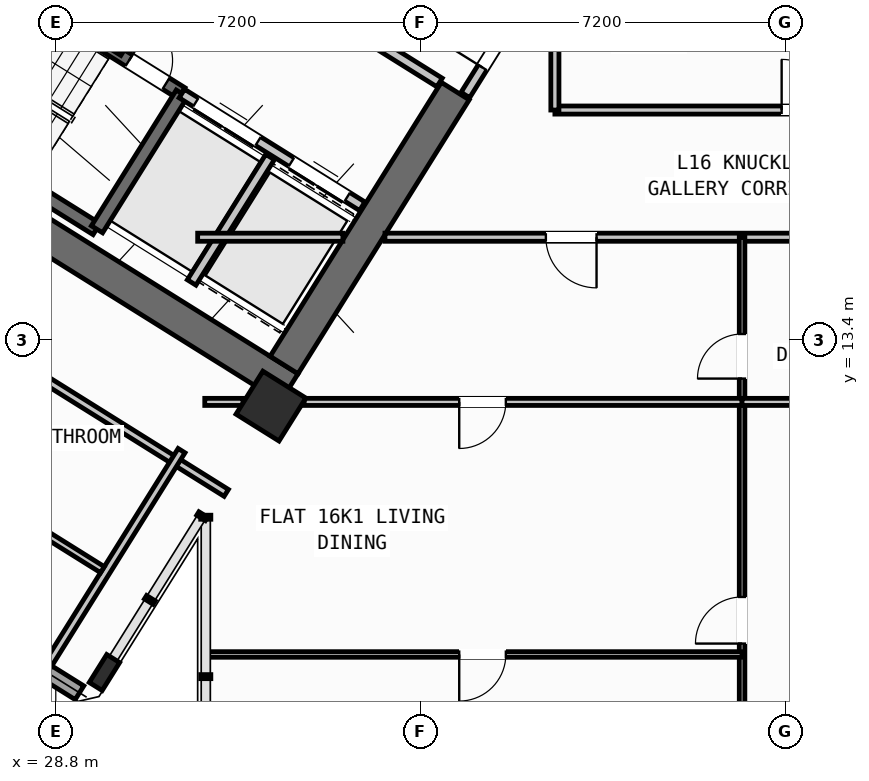
"""IFC4 building model, lengths in metres.
Left out: names, types, materials, properties, quantities, classifications, styles, units other than length and angle.
Written with IfcOpenShell. Run it as: python <this file> out.ifc"""

import sys

from ifc_helpers import new_model, si_unit, direction, frame, frame_2d, origin, origin_2d, place, context, subcontext, project, spatial, rectangle, hollow_rectangle, i_section, extrude, source, transform, mapped, element, fill, save


model = new_model("IFC4")
c1 = context("Model", 3, precision=1e-05, world=origin(), true_north=direction((0.0, 1.0)))
c2 = subcontext(c1, "Body", "Model", "MODEL_VIEW")
j1 = project(units=[si_unit("LENGTHUNIT", "METRE"), si_unit("PLANEANGLEUNIT", "RADIAN")], contexts=[c1])
p1 = place(None, origin())
s1 = spatial("IfcSite", under=j1, at=p1, CompositionType="ELEMENT")
p2 = place(p1, origin())
s2 = spatial("IfcBuilding", under=s1, at=p2, CompositionType="ELEMENT")
p3 = place(p2, frame((0.0, 0.0, 63.6)))
s3 = spatial("IfcBuildingStorey", under=s2, at=p3, CompositionType="ELEMENT", Elevation=63.6)
p4 = place(p3, frame((33.409, 12.45, 0.0), z_axis=(0.0, 0.0, 1.0), x_axis=(-0.848051132073, 0.529914405721, 0.0)))
e1 = element("IfcWall", 1, at=p4, inside=s3, PredefinedType="SHEAR", context=c2, shape_type="SweptSolid", body=[
    extrude(rectangle(XDim=13.24, YDim=0.65, at=frame_2d((6.62, 0.0))), origin(), (0.0, 0.0, 1.0), 3.35),
])
p5 = place(p3, frame((36.683, 18.304, 0.0), z_axis=(0.0, 0.0, 1.0), x_axis=(-0.529899109053, -0.848060690178, 0.0)))
e2 = element("IfcWall", 2, at=p5, inside=s3, PredefinedType="SHEAR", context=c2, shape_type="SweptSolid", body=[
    extrude(rectangle(XDim=6.375, YDim=0.65, at=frame_2d((3.188, 0.0))), origin(), (0.0, 0.0, 1.0), 3.35),
])
m1 = source(origin(), c2, "Body", "SweptSolid", [
    extrude(hollow_rectangle(XDim=1.0, YDim=1.0, WallThickness=0.04, at=origin_2d()), origin(), (0.0, 0.0, 1.0), 3.6),
])
p6 = place(p3, frame((33.046, 12.087, 0.0), z_axis=(0.0, 0.0, 1.0), x_axis=(-0.848048096156, 0.529919264233, 0.0)))
e3 = element("IfcColumn", 3, at=p6, inside=s3, PredefinedType="COLUMN", context=c2, shape_type="MappedRepresentation", body=[
    mapped(m1, transform((0.0, 0.0, 0.0), scale=1.0)),
])
m2 = source(origin(), c2, "Body", "SweptSolid", [
    extrude(i_section(OverallWidth=0.3, OverallDepth=0.65, WebThickness=0.016, FlangeThickness=0.031, at=origin_2d()), origin(), (0.0, 0.0, 1.0), 3.6),
])
p7 = place(p3, frame((29.761, 6.829, 0.0), z_axis=(0.0, 0.0, 1.0), x_axis=(-0.848048096156, 0.529919264233, 0.0)))
e4 = element("IfcColumn", 4, at=p7, inside=s3, PredefinedType="COLUMN", context=c2, shape_type="MappedRepresentation", body=[
    mapped(m2, transform((0.0, 0.0, 0.0), scale=1.0)),
])
p8 = place(p3, frame((29.268, 6.429, 0.0), z_axis=(0.0, 0.0, 1.0), x_axis=(-0.848049971435, 0.529916263149, 0.0)))
e5 = element("IfcWall", 5, at=p8, inside=s3, PredefinedType="STANDARD", context=c2, shape_type="SweptSolid", body=[
    extrude(rectangle(XDim=31.588, YDim=0.32, at=frame_2d((15.794, 0.0))), origin(), (0.0, 0.0, 1.0), 3.35),
])
p9 = place(p8, frame((16.362, 0.0, 0.0)))
e6 = element("IfcOpeningElement", 6, at=p9, cuts=e5, PredefinedType="OPENING", context=c2, shape_type="SweptSolid", body=[
    extrude(rectangle(XDim=1.2, YDim=2.15, at=frame_2d((0.6, 1.075))), frame((0.0, 0.17, 0.0), z_axis=(0.0, -1.0, 0.0), x_axis=(1.0, 0.0, 0.0)), (0.0, 0.0, 1.0), 0.34),
])
p10 = place(p8, frame((2.989, 0.0, 0.8)))
e7 = element("IfcOpeningElement", 7, at=p10, cuts=e5, PredefinedType="OPENING", context=c2, shape_type="SweptSolid", body=[
    extrude(rectangle(XDim=2.1, YDim=1.55, at=frame_2d((1.05, 0.775))), frame((0.0, 0.17, 0.0), z_axis=(0.0, -1.0, 0.0), x_axis=(1.0, 0.0, 0.0)), (0.0, 0.0, 1.0), 0.34),
])
p11 = place(p8, frame((8.359, 0.0, 0.8)))
e8 = element("IfcOpeningElement", 8, at=p11, cuts=e5, PredefinedType="OPENING", context=c2, shape_type="SweptSolid", body=[
    extrude(rectangle(XDim=2.1, YDim=1.55, at=frame_2d((1.05, 0.775))), frame((0.0, 0.17, 0.0), z_axis=(0.0, -1.0, 0.0), x_axis=(1.0, 0.0, 0.0)), (0.0, 0.0, 1.0), 0.34),
])
p12 = place(p8, frame((13.284, 0.0, 0.95)))
e9 = element("IfcOpeningElement", 9, at=p12, cuts=e5, PredefinedType="OPENING", context=c2, shape_type="SweptSolid", body=[
    extrude(rectangle(XDim=1.2, YDim=1.4, at=frame_2d((0.6, 0.7))), frame((0.0, 0.17, 0.0), z_axis=(0.0, -1.0, 0.0), x_axis=(1.0, 0.0, 0.0)), (0.0, 0.0, 1.0), 0.34),
])
p13 = place(p8, frame((29.188, 0.0, 0.95)))
e10 = element("IfcOpeningElement", 10, at=p13, cuts=e5, PredefinedType="OPENING", context=c2, shape_type="SweptSolid", body=[
    extrude(rectangle(XDim=1.2, YDim=1.4, at=frame_2d((0.6, 0.7))), frame((0.0, 0.17, 0.0), z_axis=(0.0, -1.0, 0.0), x_axis=(1.0, 0.0, 0.0)), (0.0, 0.0, 1.0), 0.34),
])
p14 = place(p8, frame((19.11, 0.0, 1.0)))
e11 = element("IfcOpeningElement", 11, at=p14, cuts=e5, PredefinedType="OPENING", context=c2, shape_type="SweptSolid", body=[
    extrude(rectangle(XDim=0.9, YDim=1.25, at=frame_2d((0.45, 0.625))), frame((0.0, 0.17, 0.0), z_axis=(0.0, -1.0, 0.0), x_axis=(1.0, 0.0, 0.0)), (0.0, 0.0, 1.0), 0.34),
])
p15 = place(p8, frame((21.226, 0.0, 1.0)))
e12 = element("IfcOpeningElement", 12, at=p15, cuts=e5, PredefinedType="OPENING", context=c2, shape_type="SweptSolid", body=[
    extrude(rectangle(XDim=0.9, YDim=1.25, at=frame_2d((0.45, 0.625))), frame((0.0, 0.17, 0.0), z_axis=(0.0, -1.0, 0.0), x_axis=(1.0, 0.0, 0.0)), (0.0, 0.0, 1.0), 0.34),
])
p16 = place(p8, frame((23.014, 0.0, 1.0)))
e13 = element("IfcOpeningElement", 13, at=p16, cuts=e5, PredefinedType="OPENING", context=c2, shape_type="SweptSolid", body=[
    extrude(rectangle(XDim=0.9, YDim=1.25, at=frame_2d((0.45, 0.625))), frame((0.0, 0.17, 0.0), z_axis=(0.0, -1.0, 0.0), x_axis=(1.0, 0.0, 0.0)), (0.0, 0.0, 1.0), 0.34),
])
p17 = place(p8, frame((24.802, 0.0, 1.0)))
e14 = element("IfcOpeningElement", 14, at=p17, cuts=e5, PredefinedType="OPENING", context=c2, shape_type="SweptSolid", body=[
    extrude(rectangle(XDim=0.9, YDim=1.25, at=frame_2d((0.45, 0.625))), frame((0.0, 0.17, 0.0), z_axis=(0.0, -1.0, 0.0), x_axis=(1.0, 0.0, 0.0)), (0.0, 0.0, 1.0), 0.34),
])
p18 = place(p8, frame((26.59, 0.0, 1.0)))
e15 = element("IfcOpeningElement", 15, at=p18, cuts=e5, PredefinedType="OPENING", context=c2, shape_type="SweptSolid", body=[
    extrude(rectangle(XDim=0.9, YDim=1.25, at=frame_2d((0.45, 0.625))), frame((0.0, 0.17, 0.0), z_axis=(0.0, -1.0, 0.0), x_axis=(1.0, 0.0, 0.0)), (0.0, 0.0, 1.0), 0.34),
])
p19 = place(p3, frame((29.605, 15.581, 0.0), z_axis=(0.0, 0.0, 1.0), x_axis=(-0.848036911448, 0.529937163087, 0.0)))
e16 = element("IfcWall", 16, at=p19, inside=s3, PredefinedType="SHEAR", context=c2, shape_type="SweptSolid", body=[
    extrude(rectangle(XDim=7.46, YDim=0.26, at=frame_2d((3.73, 0.0))), origin(), (0.0, 0.0, 1.0), 3.35),
])
p20 = place(p3, frame((31.28, 18.261, 0.0), z_axis=(0.0, 0.0, 1.0), x_axis=(-0.848051618787, 0.529913626805, 0.0)))
e17 = element("IfcWall", 17, at=p20, inside=s3, PredefinedType="SHEAR", context=c2, shape_type="SweptSolid", body=[
    extrude(rectangle(XDim=7.46, YDim=0.26, at=frame_2d((3.73, 0.0))), origin(), (0.0, 0.0, 1.0), 3.35),
])
p21 = place(p20, frame((0.36, 0.0, 0.0)))
e18 = element("IfcOpeningElement", 18, at=p21, cuts=e17, PredefinedType="OPENING", context=c2, shape_type="SweptSolid", body=[
    extrude(rectangle(XDim=0.86, YDim=2.05, at=frame_2d((0.43, 1.025))), frame((0.0, 0.14, 0.0), z_axis=(0.0, -1.0, 0.0), x_axis=(1.0, 0.0, 0.0)), (0.0, 0.0, 1.0), 0.28),
])
p22 = place(p3, frame((31.288, 18.256, 0.0), z_axis=(0.0, 0.0, 1.0), x_axis=(-0.529943379326, -0.848033026897, 0.0)))
e19 = element("IfcWall", 19, at=p22, inside=s3, PredefinedType="SHEAR", context=c2, shape_type="SweptSolid", body=[
    extrude(rectangle(XDim=3.16, YDim=0.26, at=frame_2d((1.58, 0.0))), origin(), (0.0, 0.0, 1.0), 3.35),
])
p23 = place(p3, frame((34.848, 16.031, 0.0), z_axis=(0.0, 0.0, 1.0), x_axis=(-0.848044042236, 0.529925751807, 0.0)))
e20 = element("IfcWall", 20, at=p23, inside=s3, PredefinedType="STANDARD", context=c2, shape_type="SweptSolid", body=[
    extrude(rectangle(XDim=4.198, YDim=0.2, at=frame_2d((2.099, 0.0))), origin(), (0.0, 0.0, 1.0), 3.34),
])
p24 = place(p23, frame((0.348, 0.0, 0.0)))
e21 = element("IfcOpeningElement", 21, at=p24, cuts=e20, PredefinedType="OPENING", context=c2, shape_type="SweptSolid", body=[
    extrude(rectangle(XDim=1.3, YDim=2.2, at=frame_2d((0.65, 1.1))), frame((0.0, 0.11, 0.0), z_axis=(0.0, -1.0, 0.0), x_axis=(1.0, 0.0, 0.0)), (0.0, 0.0, 1.0), 0.22),
])
p25 = place(p23, frame((2.423, 0.0, 0.0)))
e22 = element("IfcOpeningElement", 22, at=p25, cuts=e20, PredefinedType="OPENING", context=c2, shape_type="SweptSolid", body=[
    extrude(rectangle(XDim=1.45, YDim=2.25, at=frame_2d((0.725, 1.125))), frame((0.0, 0.11, 0.0), z_axis=(0.0, -1.0, 0.0), x_axis=(1.0, 0.0, 0.0)), (0.0, 0.0, 1.0), 0.22),
])
p26 = place(p3, frame((36.374, 18.474, 0.0), z_axis=(0.0, 0.0, 1.0), x_axis=(-0.848051071577, 0.529914502535, 0.0)))
e23 = element("IfcWall", 23, at=p26, inside=s3, PredefinedType="STANDARD", context=c2, shape_type="SweptSolid", body=[
    extrude(rectangle(XDim=5.718, YDim=0.2, at=frame_2d((2.859, 0.0))), origin(), (0.0, 0.0, 1.0), 3.34),
])
p27 = place(p26, frame((2.498, 0.0, 0.0)))
e24 = element("IfcOpeningElement", 24, at=p27, cuts=e23, PredefinedType="OPENING", context=c2, shape_type="SweptSolid", body=[
    extrude(rectangle(XDim=1.15, YDim=2.1, at=frame_2d((0.575, 1.05))), frame((0.0, 0.11, 0.0), z_axis=(0.0, -1.0, 0.0), x_axis=(1.0, 0.0, 0.0)), (0.0, 0.0, 1.0), 0.22),
])
p28 = place(p3, frame((33.029, 17.003, 0.0), z_axis=(0.0, 0.0, 1.0), x_axis=(-0.529916267533, -0.848049968695, 0.0)))
e25 = element("IfcWall", 25, at=p28, inside=s3, PredefinedType="STANDARD", context=c2, shape_type="SweptSolid", body=[
    extrude(rectangle(XDim=2.92, YDim=0.2, at=frame_2d((1.46, 0.0))), origin(), (0.0, 0.0, 1.0), 3.34),
])
p29 = place(p3, frame((31.525, 21.504, 0.0), z_axis=(0.0, 0.0, 1.0), x_axis=(-0.529907497854, -0.848055448493, 0.0)))
e26 = element("IfcWall", 26, at=p29, inside=s3, PredefinedType="STANDARD", context=c2, shape_type="SweptSolid", body=[
    extrude(rectangle(XDim=2.88, YDim=0.2, at=frame_2d((1.44, 0.0))), origin(), (0.0, 0.0, 1.0), 3.34),
])
p30 = place(p3, frame((32.164, 10.374, 0.0), z_axis=(0.0, 0.0, 1.0), x_axis=(-0.848044107957, 0.529925646633, 0.0)))
e27 = element("IfcWall", 27, at=p30, inside=s3, PredefinedType="PARTITIONING", context=c2, shape_type="SweptSolid", body=[
    extrude(rectangle(XDim=15.57, YDim=0.16, at=frame_2d((7.785, 0.0))), origin(), (0.0, 0.0, 1.0), 3.34),
])
p31 = place(p30, frame((10.83, 0.0, 0.0)))
e28 = element("IfcOpeningElement", 28, at=p31, cuts=e27, PredefinedType="OPENING", context=c2, shape_type="SweptSolid", body=[
    extrude(rectangle(XDim=1.0, YDim=2.1, at=frame_2d((0.5, 1.05))), frame((0.0, 0.09, 0.0), z_axis=(0.0, -1.0, 0.0), x_axis=(1.0, 0.0, 0.0)), (0.0, 0.0, 1.0), 0.18),
])
p32 = place(p3, frame((31.282, 11.208, 0.0), z_axis=(0.0, 0.0, 1.0), x_axis=(-0.529938869374, -0.84803584519, 0.0)))
e29 = element("IfcWall", 29, at=p32, inside=s3, PredefinedType="PARTITIONING", context=c2, shape_type="SweptSolid", body=[
    extrude(rectangle(XDim=5.48, YDim=0.16, at=frame_2d((2.74, 0.0))), origin(), (0.0, 0.0, 1.0), 3.34),
])
p33 = place(p3, frame((29.72, 8.859, 0.0), z_axis=(0.0, 0.0, 1.0), x_axis=(-0.848049134363, 0.529917602752, 0.0)))
e30 = element("IfcWall", 30, at=p33, inside=s3, PredefinedType="PLUMBINGWALL", context=c2, shape_type="SweptSolid", body=[
    extrude(rectangle(XDim=14.3, YDim=0.14, at=frame_2d((7.15, 0.0))), origin(), (0.0, 0.0, 1.0), 3.34),
])
p34 = place(p33, frame((9.57, 0.0, 0.0)))
e31 = element("IfcOpeningElement", 31, at=p34, cuts=e30, PredefinedType="OPENING", context=c2, shape_type="SweptSolid", body=[
    extrude(rectangle(XDim=0.92, YDim=2.08, at=frame_2d((0.46, 1.04))), frame((0.0, 0.08, 0.0), z_axis=(0.0, -1.0, 0.0), x_axis=(1.0, 0.0, 0.0)), (0.0, 0.0, 1.0), 0.16),
])
p35 = place(p3, frame((38.451, 20.737, 0.0), z_axis=(0.0, 0.0, 1.0), x_axis=(-0.529924799939, -0.848044637038, 0.0)))
e32 = element("IfcWall", 32, at=p35, inside=s3, PredefinedType="STANDARD", context=c2, shape_type="SweptSolid", body=[
    extrude(rectangle(XDim=2.96, YDim=0.2, at=frame_2d((1.48, 0.0))), origin(), (0.0, 0.0, 1.0), 3.34),
])
p36 = place(p35, frame((1.46, 0.0, 0.0)))
e33 = element("IfcOpeningElement", 33, at=p36, cuts=e32, PredefinedType="OPENING", context=c2, shape_type="SweptSolid", body=[
    extrude(rectangle(XDim=0.86, YDim=2.05, at=frame_2d((0.43, 1.025))), frame((0.0, 0.11, 0.0), z_axis=(0.0, -1.0, 0.0), x_axis=(1.0, 0.0, 0.0)), (0.0, 0.0, 1.0), 0.22),
])
p37 = place(p3, frame((31.6, 15.42, 0.0), z_axis=(0.0, 0.0, 1.0), x_axis=(1.0, 0.0, 0.0)))
e34 = element("IfcWall", 34, at=p37, inside=s3, PredefinedType="PARTITIONING", context=c2, shape_type="SweptSolid", body=[
    extrude(rectangle(XDim=2.866, YDim=0.16, at=frame_2d((1.433, 0.0))), origin(), (0.0, 0.0, 1.0), 3.34),
])
p38 = place(p3, frame((35.296, 15.42, 0.0), z_axis=(0.0, 0.0, 1.0), x_axis=(1.0, 0.0, 0.0)))
e35 = element("IfcWall", 35, at=p38, inside=s3, PredefinedType="PARTITIONING", context=c2, shape_type="SweptSolid", body=[
    extrude(rectangle(XDim=15.311, YDim=0.16, at=frame_2d((7.655, 0.0))), origin(), (0.0, 0.0, 1.0), 3.34),
])
p39 = place(p38, frame((3.176, 0.0, 0.0)))
e36 = element("IfcOpeningElement", 36, at=p39, cuts=e35, PredefinedType="OPENING", context=c2, shape_type="SweptSolid", body=[
    extrude(rectangle(XDim=1.0, YDim=2.1, at=frame_2d((0.5, 1.05))), frame((0.0, 0.09, 0.0), z_axis=(0.0, -1.0, 0.0), x_axis=(1.0, 0.0, 0.0)), (0.0, 0.0, 1.0), 0.18),
])
p40 = place(p3, frame((38.65, 17.93, 0.0), z_axis=(0.0, 0.0, 1.0), x_axis=(1.0, 0.0, 0.0)))
e37 = element("IfcWall", 37, at=p40, inside=s3, PredefinedType="PARTITIONING", context=c2, shape_type="SweptSolid", body=[
    extrude(rectangle(XDim=9.95, YDim=0.16, at=frame_2d((4.975, 0.0))), origin(), (0.0, 0.0, 1.0), 3.34),
])
p41 = place(p40, frame((4.475, 0.0, 0.0)))
e38 = element("IfcOpeningElement", 38, at=p41, cuts=e37, PredefinedType="OPENING", context=c2, shape_type="SweptSolid", body=[
    extrude(rectangle(XDim=1.0, YDim=2.1, at=frame_2d((0.5, 1.05))), frame((0.0, 0.09, 0.0), z_axis=(0.0, -1.0, 0.0), x_axis=(1.0, 0.0, 0.0)), (0.0, 0.0, 1.0), 0.18),
])
p42 = place(p3, frame((38.65, 17.93, 0.0), z_axis=(0.0, 0.0, 1.0), x_axis=(0.0, 1.0, 0.0)))
e39 = element("IfcWall", 39, at=p42, inside=s3, PredefinedType="PARTITIONING", context=c2, shape_type="SweptSolid", body=[
    extrude(rectangle(XDim=2.857, YDim=0.16, at=frame_2d((1.428, 0.0))), origin(), (0.0, 0.0, 1.0), 3.34),
])
p43 = place(p3, frame((42.344, 1.96, 0.0), z_axis=(0.0, 0.0, 1.0), x_axis=(0.0, 1.0, 0.0)))
e40 = element("IfcWall", 40, at=p43, inside=s3, PredefinedType="PARTITIONING", context=c2, shape_type="SweptSolid", body=[
    extrude(rectangle(XDim=13.46, YDim=0.11, at=frame_2d((6.73, 0.0))), origin(), (0.0, 0.0, 1.0), 3.34),
])
p44 = place(p43, frame((5.44, 0.0, 0.0)))
e41 = element("IfcOpeningElement", 41, at=p44, cuts=e40, PredefinedType="OPENING", context=c2, shape_type="SweptSolid", body=[
    extrude(rectangle(XDim=0.92, YDim=2.08, at=frame_2d((0.46, 1.04))), frame((0.0, 0.065, 0.0), z_axis=(0.0, -1.0, 0.0), x_axis=(1.0, 0.0, 0.0)), (0.0, 0.0, 1.0), 0.13),
])
p45 = place(p43, frame((10.67, 0.0, 0.0)))
e42 = element("IfcOpeningElement", 42, at=p45, cuts=e40, PredefinedType="OPENING", context=c2, shape_type="SweptSolid", body=[
    extrude(rectangle(XDim=0.88, YDim=2.08, at=frame_2d((0.44, 1.04))), frame((0.0, 0.065, 0.0), z_axis=(0.0, -1.0, 0.0), x_axis=(1.0, 0.0, 0.0)), (0.0, 0.0, 1.0), 0.13),
])
p46 = place(p3, frame((31.74, 12.17, 0.0), z_axis=(0.0, 0.0, 1.0), x_axis=(1.0, 0.0, 0.0)))
e43 = element("IfcWall", 43, at=p46, inside=s3, PredefinedType="PLUMBINGWALL", context=c2, shape_type="SweptSolid", body=[
    extrude(rectangle(XDim=0.754, YDim=0.14, at=frame_2d((0.377, 0.0))), origin(), (0.0, 0.0, 1.0), 3.34),
])
p47 = place(p3, frame((33.702, 12.17, 0.0), z_axis=(0.0, 0.0, 1.0), x_axis=(1.0, 0.0, 0.0)))
e44 = element("IfcWall", 44, at=p47, inside=s3, PredefinedType="PLUMBINGWALL", context=c2, shape_type="SweptSolid", body=[
    extrude(rectangle(XDim=8.642, YDim=0.14, at=frame_2d((4.321, 0.0))), origin(), (0.0, 0.0, 1.0), 2.525),
])
p48 = place(p47, frame((3.06, 0.0, 0.0)))
e45 = element("IfcOpeningElement", 45, at=p48, cuts=e44, PredefinedType="OPENING", context=c2, shape_type="SweptSolid", body=[
    extrude(rectangle(XDim=0.92, YDim=2.08, at=frame_2d((0.46, 1.04))), frame((0.0, 0.08, 0.0), z_axis=(0.0, -1.0, 0.0), x_axis=(1.0, 0.0, 0.0)), (0.0, 0.0, 1.0), 0.16),
])
p49 = place(p3, frame((42.344, 12.17, 0.0), z_axis=(0.0, 0.0, 1.0), x_axis=(1.0, 0.0, 0.0)))
e46 = element("IfcWall", 46, at=p49, inside=s3, PredefinedType="PLUMBINGWALL", context=c2, shape_type="SweptSolid", body=[
    extrude(rectangle(XDim=9.916, YDim=0.14, at=frame_2d((4.958, 0.0))), origin(), (0.0, 0.0, 1.0), 2.525),
])
p50 = place(p3, frame((31.74, 7.185, 0.0), z_axis=(0.0, 0.0, 1.0), x_axis=(1.0, 0.0, 0.0)))
e47 = element("IfcWall", 47, at=p50, inside=s3, PredefinedType="PARTITIONING", context=c2, shape_type="SweptSolid", body=[
    extrude(rectangle(XDim=10.604, YDim=0.11, at=frame_2d((5.302, 0.0))), origin(), (0.0, 0.0, 1.0), 3.34),
])
p51 = place(p50, frame((5.022, 0.0, 0.0)))
e48 = element("IfcOpeningElement", 48, at=p51, cuts=e47, PredefinedType="OPENING", context=c2, shape_type="SweptSolid", body=[
    extrude(rectangle(XDim=0.92, YDim=2.08, at=frame_2d((0.46, 1.04))), frame((0.0, 0.065, 0.0), z_axis=(0.0, -1.0, 0.0), x_axis=(1.0, 0.0, 0.0)), (0.0, 0.0, 1.0), 0.13),
])
m3 = source(origin(), c2, "Body", "SweptSolid", [
    extrude(rectangle(XDim=0.86, YDim=2.05, at=frame_2d((0.43, 1.025))), frame((0.0, 0.025, 0.0), z_axis=(0.0, -1.0, 0.0), x_axis=(1.0, 0.0, 0.0)), (0.0, 0.0, 1.0), 0.05),
])
p52 = place(p21, frame((0.86, 0.0, 0.0), z_axis=(0.0, 0.0, 1.0), x_axis=(-1.0, 0.0, 0.0)))
e49 = element("IfcDoor", 49, at=p52, inside=s3, OperationType="SINGLE_SWING_LEFT", PredefinedType="DOOR", context=c2, shape_type="MappedRepresentation", body=[
    mapped(m3, transform((0.0, 0.0, 0.0), scale=1.0)),
])
fill(e18, e49)
m4 = source(origin(), c2, "Body", "SweptSolid", [
    extrude(rectangle(XDim=1.3, YDim=2.2, at=frame_2d((0.65, 1.1))), frame((0.0, 0.025, 0.0), z_axis=(0.0, -1.0, 0.0), x_axis=(1.0, 0.0, 0.0)), (0.0, 0.0, 1.0), 0.05),
])
p53 = place(p24, origin())
e50 = element("IfcDoor", 50, at=p53, inside=s3, OperationType="DOUBLE_DOOR_SLIDING", PredefinedType="DOOR", context=c2, shape_type="MappedRepresentation", body=[
    mapped(m4, transform((0.0, 0.0, 0.0), scale=1.0)),
])
fill(e21, e50)
m5 = source(origin(), c2, "Body", "SweptSolid", [
    extrude(rectangle(XDim=1.45, YDim=2.25, at=frame_2d((0.725, 1.125))), frame((0.0, 0.025, 0.0), z_axis=(0.0, -1.0, 0.0), x_axis=(1.0, 0.0, 0.0)), (0.0, 0.0, 1.0), 0.05),
])
p54 = place(p25, origin())
e51 = element("IfcDoor", 51, at=p54, inside=s3, OperationType="DOUBLE_DOOR_SLIDING", PredefinedType="DOOR", context=c2, shape_type="MappedRepresentation", body=[
    mapped(m5, transform((0.0, 0.0, 0.0), scale=1.0)),
])
fill(e22, e51)
m6 = source(origin(), c2, "Body", "SweptSolid", [
    extrude(rectangle(XDim=1.0, YDim=2.1, at=frame_2d((0.5, 1.05))), frame((0.0, 0.025, 0.0), z_axis=(0.0, -1.0, 0.0), x_axis=(1.0, 0.0, 0.0)), (0.0, 0.0, 1.0), 0.05),
])
p55 = place(p41, origin())
e52 = element("IfcDoor", 52, at=p55, inside=s3, OperationType="SINGLE_SWING_LEFT", PredefinedType="DOOR", context=c2, shape_type="MappedRepresentation", body=[
    mapped(m6, transform((0.0, 0.0, 0.0), scale=1.0)),
])
fill(e38, e52)
p56 = place(p36, frame((0.86, 0.0, 0.0), z_axis=(0.0, 0.0, 1.0), x_axis=(-1.0, 0.0, 0.0)))
e53 = element("IfcDoor", 53, at=p56, inside=s3, OperationType="SINGLE_SWING_LEFT", PredefinedType="DOOR", context=c2, shape_type="MappedRepresentation", body=[
    mapped(m3, transform((0.0, 0.0, 0.0), scale=1.0)),
])
fill(e33, e53)
m7 = source(origin(), c2, "Body", "SweptSolid", [
    extrude(rectangle(XDim=0.92, YDim=2.08, at=frame_2d((0.46, 1.04))), frame((0.0, 0.025, 0.0), z_axis=(0.0, -1.0, 0.0), x_axis=(1.0, 0.0, 0.0)), (0.0, 0.0, 1.0), 0.05),
])
p57 = place(p51, frame((0.92, 0.0, 0.0), z_axis=(0.0, 0.0, 1.0), x_axis=(-1.0, 0.0, 0.0)))
e54 = element("IfcDoor", 54, at=p57, inside=s3, OperationType="SINGLE_SWING_RIGHT", PredefinedType="DOOR", context=c2, shape_type="MappedRepresentation", body=[
    mapped(m7, transform((0.0, 0.0, 0.0), scale=1.0)),
])
fill(e48, e54)
p58 = place(p44, origin())
e55 = element("IfcDoor", 55, at=p58, inside=s3, OperationType="SINGLE_SWING_LEFT", PredefinedType="DOOR", context=c2, shape_type="MappedRepresentation", body=[
    mapped(m7, transform((0.0, 0.0, 0.0), scale=1.0)),
])
fill(e41, e55)
p59 = place(p39, frame((1.0, 0.0, 0.0), z_axis=(0.0, 0.0, 1.0), x_axis=(-1.0, 0.0, 0.0)))
e56 = element("IfcDoor", 56, at=p59, inside=s3, OperationType="SINGLE_SWING_LEFT", PredefinedType="DOOR", context=c2, shape_type="MappedRepresentation", body=[
    mapped(m6, transform((0.0, 0.0, 0.0), scale=1.0)),
])
fill(e36, e56)
p60 = place(p48, frame((0.92, 0.0, 0.0), z_axis=(0.0, 0.0, 1.0), x_axis=(-1.0, 0.0, 0.0)))
e57 = element("IfcDoor", 57, at=p60, inside=s3, OperationType="SINGLE_SWING_RIGHT", PredefinedType="DOOR", context=c2, shape_type="MappedRepresentation", body=[
    mapped(m7, transform((0.0, 0.0, 0.0), scale=1.0)),
])
fill(e45, e57)
m8 = source(origin(), c2, "Body", "SweptSolid", [
    extrude(rectangle(XDim=0.88, YDim=2.08, at=frame_2d((0.44, 1.04))), frame((0.0, 0.025, 0.0), z_axis=(0.0, -1.0, 0.0), x_axis=(1.0, 0.0, 0.0)), (0.0, 0.0, 1.0), 0.05),
])
p61 = place(p45, origin())
e58 = element("IfcDoor", 58, at=p61, inside=s3, OperationType="SINGLE_SWING_LEFT", PredefinedType="DOOR", context=c2, shape_type="MappedRepresentation", body=[
    mapped(m8, transform((0.0, 0.0, 0.0), scale=1.0)),
])
fill(e42, e58)
save(model, sys.argv[1])
